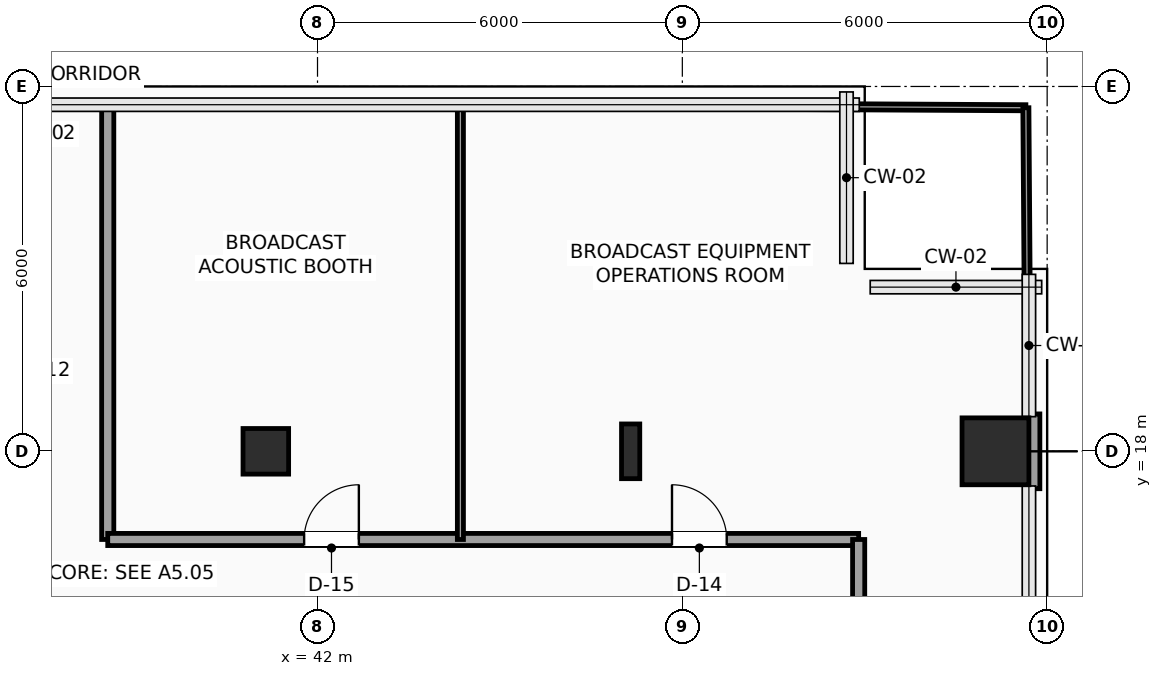
"""IFC4 building model, lengths in metres.
Left out: names, types, materials, properties, quantities, classifications, styles, units other than length and angle.
Written with IfcOpenShell. Run it as: python <this file> out.ifc"""

import sys

from ifc_helpers import new_model, si_unit, direction, frame, frame_2d, origin, origin_2d, place, context, subcontext, project, spatial, rectangle, hollow_rectangle, i_section, extrude, element, fill, save


model = new_model("IFC4")
c1 = context("Model", 3, precision=1e-05, world=origin(), true_north=direction((0.0, 1.0)))
c2 = subcontext(c1, "Body", "Model", "MODEL_VIEW")
j1 = project(units=[si_unit("LENGTHUNIT", "METRE"), si_unit("PLANEANGLEUNIT", "RADIAN")], contexts=[c1])
p1 = place(None, origin())
s1 = spatial("IfcSite", under=j1, at=p1, CompositionType="ELEMENT")
p2 = place(p1, origin())
s2 = spatial("IfcBuilding", under=s1, at=p2, CompositionType="ELEMENT")
p3 = place(p2, frame((0.0, 0.0, 87.0)))
s3 = spatial("IfcBuildingStorey", under=s2, at=p3, CompositionType="ELEMENT", Elevation=87.0)
p4 = place(p3, frame((41.15, 18.0, 0.0), z_axis=(0.0, 0.0, 1.0), x_axis=(1.0, 0.0, 0.0)))
e1 = element("IfcColumn", 1, at=p4, inside=s3, PredefinedType="COLUMN", context=c2, shape_type="SweptSolid", body=[
    extrude(hollow_rectangle(XDim=0.75, YDim=0.75, WallThickness=0.035, InnerFilletRadius=0.035, OuterFilletRadius=0.05, at=origin_2d()), origin(), (0.0, 0.0, 1.0), 3.9),
])
p5 = place(p3, frame((47.15, 18.0, 0.0), z_axis=(0.0, 0.0, 1.0), x_axis=(1.0, 0.0, 0.0)))
e2 = element("IfcColumn", 2, at=p5, inside=s3, PredefinedType="COLUMN", context=c2, shape_type="SweptSolid", body=[
    extrude(i_section(OverallWidth=0.3, OverallDepth=0.9, WebThickness=0.019, FlangeThickness=0.035, FilletRadius=0.03, at=origin_2d()), origin(), (0.0, 0.0, 1.0), 3.9),
])
p6 = place(p3, frame((53.15, 18.0, 0.0), z_axis=(0.0, 0.0, 1.0), x_axis=(1.0, 0.0, 0.0)))
e3 = element("IfcColumn", 3, at=p6, inside=s3, PredefinedType="COLUMN", context=c2, shape_type="SweptSolid", body=[
    extrude(rectangle(XDim=1.1, YDim=1.1, at=origin_2d()), origin(), (0.0, 0.0, 1.0), 3.9),
])
p7 = place(p3, frame((53.76, 18.615, 0.0), z_axis=(0.0, 0.0, 1.0), x_axis=(0.0, -1.0, 0.0)))
e4 = element("IfcWall", 4, at=p7, inside=s3, PredefinedType="SOLIDWALL", context=c2, shape_type="SweptSolid", body=[
    extrude(rectangle(XDim=1.23, YDim=0.24, at=frame_2d((0.615, 0.0))), origin(), (0.0, 0.0, 1.0), 3.65),
])
p8 = place(p3, frame((38.55, 23.7, 0.0), z_axis=(0.0, 0.0, 1.0), x_axis=(0.0, -1.0, 0.0)))
e5 = element("IfcWall", 5, at=p8, inside=s3, PredefinedType="SOLIDWALL", context=c2, shape_type="SweptSolid", body=[
    extrude(rectangle(XDim=7.15, YDim=0.2, at=frame_2d((3.575, 0.0))), origin(), (0.0, 0.0, 1.0), 3.65),
])
p9 = place(p3, frame((38.55, 16.55, 0.0), z_axis=(0.0, 0.0, 1.0), x_axis=(1.0, 0.0, 0.0)))
e6 = element("IfcWall", 6, at=p9, inside=s3, PredefinedType="SOLIDWALL", context=c2, shape_type="SweptSolid", body=[
    extrude(rectangle(XDim=12.35, YDim=0.2, at=frame_2d((6.175, 0.0))), origin(), (0.0, 0.0, 1.0), 3.65),
])
p10 = place(p9, frame((3.23, 0.0, 0.0)))
e7 = element("IfcOpeningElement", 7, at=p10, cuts=e6, PredefinedType="OPENING", context=c2, shape_type="SweptSolid", body=[
    extrude(rectangle(XDim=0.9, YDim=2.1, at=frame_2d((0.45, 1.05))), frame((0.0, 0.11, 0.0), z_axis=(0.0, -1.0, 0.0), x_axis=(1.0, 0.0, 0.0)), (0.0, 0.0, 1.0), 0.22),
])
p11 = place(p9, frame((9.28, 0.0, 0.0)))
e8 = element("IfcOpeningElement", 8, at=p11, cuts=e6, PredefinedType="OPENING", context=c2, shape_type="SweptSolid", body=[
    extrude(rectangle(XDim=0.9, YDim=2.1, at=frame_2d((0.45, 1.05))), frame((0.0, 0.11, 0.0), z_axis=(0.0, -1.0, 0.0), x_axis=(1.0, 0.0, 0.0)), (0.0, 0.0, 1.0), 0.22),
])
p12 = place(p3, frame((50.9, 16.55, 0.0), z_axis=(0.0, 0.0, 1.0), x_axis=(0.0, -1.0, 0.0)))
e9 = element("IfcWall", 9, at=p12, inside=s3, PredefinedType="SOLIDWALL", context=c2, shape_type="SweptSolid", body=[
    extrude(rectangle(XDim=2.35, YDim=0.2, at=frame_2d((1.175, 0.0))), origin(), (0.0, 0.0, 1.0), 3.65),
])
p13 = place(p3, frame((44.35, 16.55, 0.0), z_axis=(0.0, 0.0, 1.0), x_axis=(0.0, 1.0, 0.0)))
e10 = element("IfcWall", 10, at=p13, inside=s3, PredefinedType="PARTITIONING", context=c2, shape_type="SweptSolid", body=[
    extrude(rectangle(XDim=7.15, YDim=0.1, at=frame_2d((3.575, 0.0))), origin(), (0.0, 0.0, 1.0), 3.65),
])
p14 = place(p3, frame((44.35, 23.7, 0.0), z_axis=(0.0, 0.0, 1.0), x_axis=(0.999985518927, -0.005381629512, 0.0)))
e11 = element("IfcWall", 11, at=p14, inside=s3, PredefinedType="PARTITIONING", context=c2, shape_type="SweptSolid", body=[
    extrude(rectangle(XDim=9.3, YDim=0.1, at=frame_2d((4.65, 0.0))), origin(), (0.0, 0.0, 1.0), 3.65),
])
p15 = place(p3, frame((53.7, 16.55, 0.0), z_axis=(0.0, 0.0, 1.0), x_axis=(-0.007017371073, 0.999975377948, 0.0)))
e12 = element("IfcWall", 12, at=p15, inside=s3, PredefinedType="PARTITIONING", context=c2, shape_type="SweptSolid", body=[
    extrude(rectangle(XDim=0.835, YDim=0.1, at=frame_2d((0.417, 0.0))), origin(), (0.0, 0.0, 1.0), 3.65),
])
p16 = place(p3, frame((53.686, 18.615, 0.0), z_axis=(0.0, 0.0, 1.0), x_axis=(-0.007079296972, 0.999974941463, 0.0)))
e13 = element("IfcWall", 13, at=p16, inside=s3, PredefinedType="PARTITIONING", context=c2, shape_type="SweptSolid", body=[
    extrude(rectangle(XDim=5.035, YDim=0.1, at=frame_2d((2.518, 0.0))), origin(), (0.0, 0.0, 1.0), 3.65),
])
p17 = place(p10, origin())
e14 = element("IfcDoor", 14, at=p17, inside=s3, OperationType="SINGLE_SWING_RIGHT", PredefinedType="DOOR", context=c2, shape_type="SweptSolid", body=[
    extrude(rectangle(XDim=0.9, YDim=2.1, at=frame_2d((0.45, 1.05))), frame((0.0, 0.025, 0.0), z_axis=(0.0, -1.0, 0.0), x_axis=(1.0, 0.0, 0.0)), (0.0, 0.0, 1.0), 0.05),
])
fill(e7, e14)
p18 = place(p11, origin())
e15 = element("IfcDoor", 15, at=p18, inside=s3, OperationType="SINGLE_SWING_LEFT", PredefinedType="DOOR", context=c2, shape_type="SweptSolid", body=[
    extrude(rectangle(XDim=0.9, YDim=2.1, at=frame_2d((0.45, 1.05))), frame((0.0, 0.025, 0.0), z_axis=(0.0, -1.0, 0.0), x_axis=(1.0, 0.0, 0.0)), (0.0, 0.0, 1.0), 0.05),
])
fill(e8, e15)
save(model, sys.argv[1])
